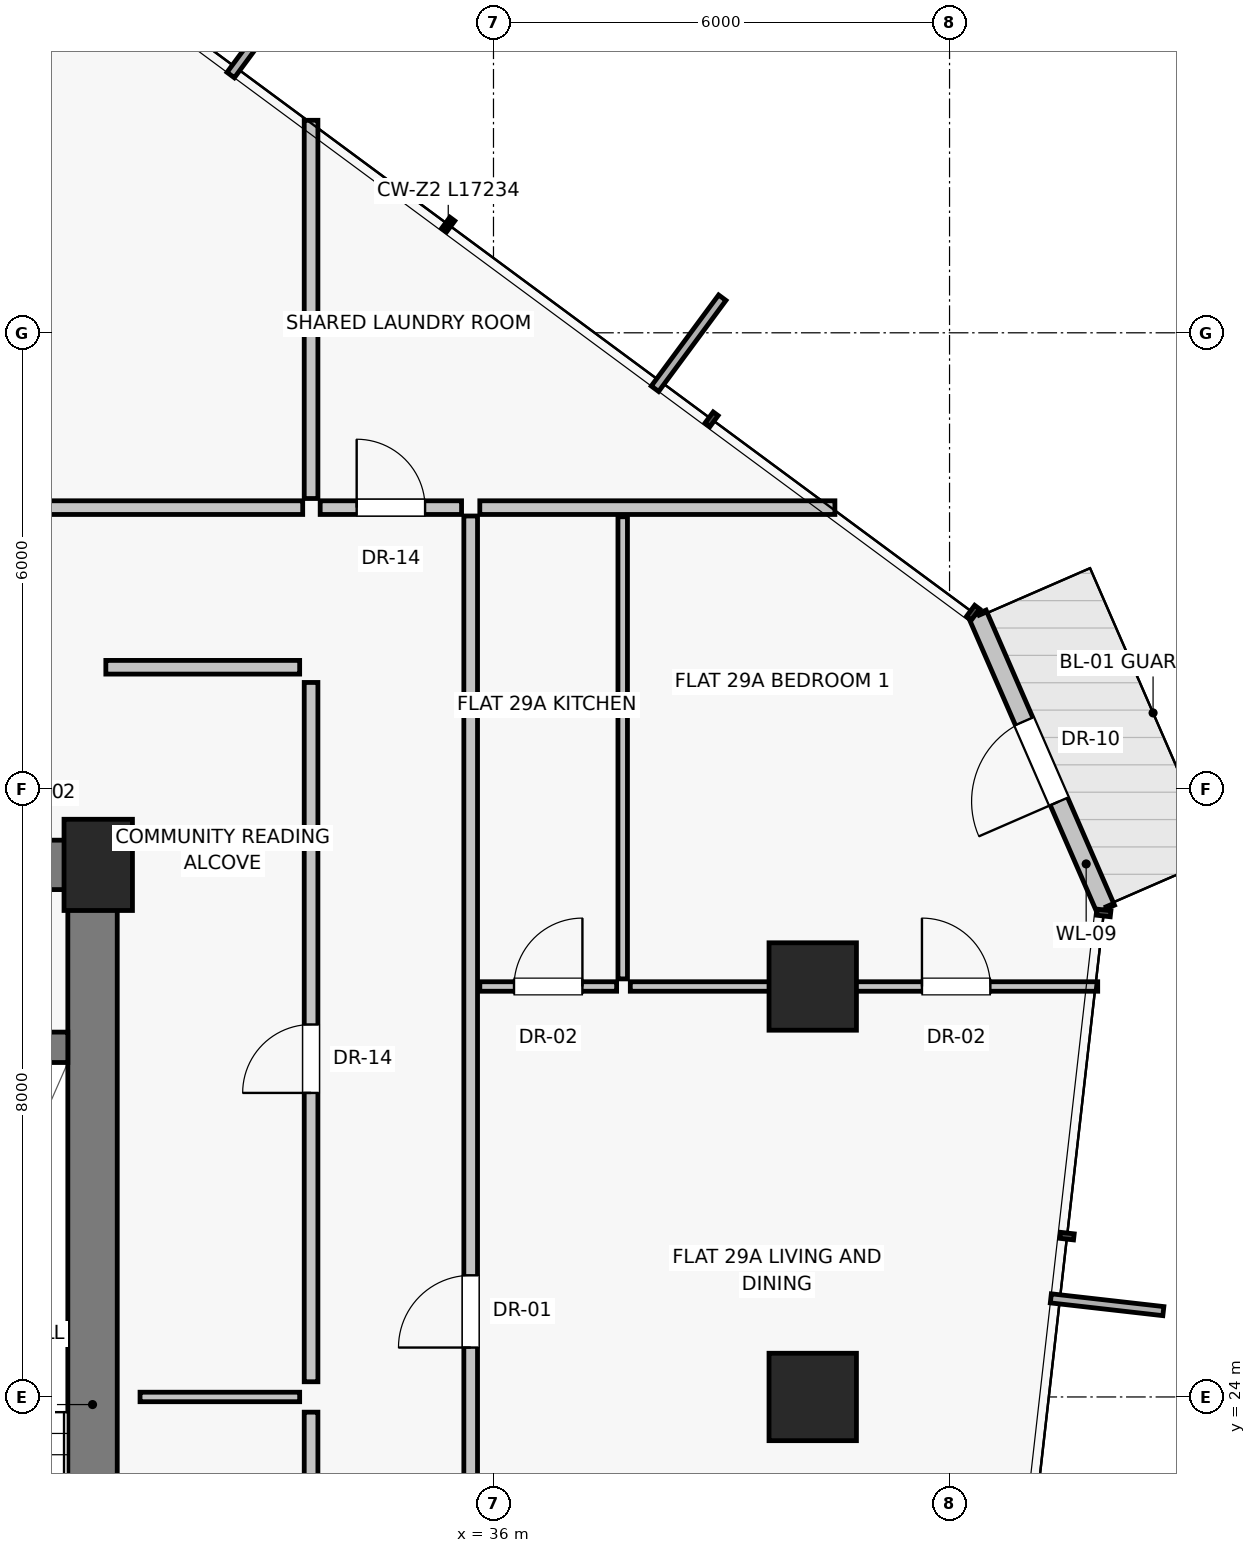
"""IFC4 building model, lengths in metres.
Left out: names, types, materials, properties, quantities, classifications, styles, units other than length and angle.
Written with IfcOpenShell. Run it as: python <this file> out.ifc"""

import sys

from ifc_helpers import new_model, si_unit, direction, frame, frame_2d, origin, origin_2d, place, context, subcontext, project, spatial, rectangle, extrude, source, transform, mapped, element, fill, save


model = new_model("IFC4")
c1 = context("Model", 3, precision=1e-05, world=origin(), true_north=direction((0.0, 1.0)))
c2 = subcontext(c1, "Body", "Model", "MODEL_VIEW")
j1 = project(units=[si_unit("LENGTHUNIT", "METRE"), si_unit("PLANEANGLEUNIT", "RADIAN")], contexts=[c1])
p1 = place(None, origin())
s1 = spatial("IfcSite", under=j1, at=p1, CompositionType="ELEMENT")
p2 = place(p1, origin())
s2 = spatial("IfcBuilding", under=s1, at=p2, CompositionType="ELEMENT")
p3 = place(p2, frame((0.0, 0.0, 105.7)))
s3 = spatial("IfcBuildingStorey", under=s2, at=p3, CompositionType="ELEMENT", Elevation=105.7)
p4 = place(p3, frame((30.8, 31.0, 0.0), z_axis=(0.0, 0.0, 1.0), x_axis=(1.0, 0.0, 0.0)))
e1 = element("IfcColumn", 1, at=p4, inside=s3, PredefinedType="PILASTER", context=c2, shape_type="SweptSolid", body=[
    extrude(rectangle(XDim=0.9, YDim=1.2, at=origin_2d()), origin(), (0.0, 0.0, 1.0), 3.25),
])
for number, where, z_axis, x_axis in (
    (2, (40.2, 24.0, 0.0), (0.0, 0.0, 1.0), (1.0, 0.0, 0.0)),
    (3, (40.2, 29.4, 0.0), (0.0, 0.0, 1.0), (1.0, 0.0, 0.0)),
):
    element("IfcColumn", number, at=place(p3, frame(where, z_axis=z_axis, x_axis=x_axis)), inside=s3, PredefinedType="COLUMN", context=c2, shape_type="SweptSolid", body=[
        extrude(rectangle(XDim=1.15, YDim=1.15, at=origin_2d()), origin(), (0.0, 0.0, 1.0), 3.25),
    ])
p5 = place(p3, frame((44.055, 30.42, 0.0), z_axis=(0.0, 0.0, 1.0), x_axis=(-0.399084577484, 0.916914118124, 0.0)))
e4 = element("IfcWall", 4, at=p5, inside=s3, PredefinedType="SOLIDWALL", context=c2, shape_type="SweptSolid", body=[
    extrude(rectangle(XDim=4.233, YDim=0.25, at=frame_2d((2.117, 0.0))), origin(), (0.0, 0.0, 1.0), 2.97),
])
p6 = place(p5, frame((1.542, 0.0, 0.0)))
e5 = element("IfcOpeningElement", 5, at=p6, cuts=e4, PredefinedType="OPENING", context=c2, shape_type="SweptSolid", body=[
    extrude(rectangle(XDim=1.15, YDim=2.25, at=frame_2d((0.575, 1.125))), frame((0.0, 0.135, 0.0), z_axis=(0.0, -1.0, 0.0), x_axis=(1.0, 0.0, 0.0)), (0.0, 0.0, 1.0), 0.27),
])
p7 = place(p3, frame((30.725, 16.8, 0.0), z_axis=(0.0, 0.0, 1.0), x_axis=(0.0, 1.0, 0.0)))
e6 = element("IfcWall", 6, at=p7, inside=s3, PredefinedType="SHEAR", context=c2, shape_type="SweptSolid", body=[
    extrude(rectangle(XDim=14.2, YDim=0.65, at=frame_2d((7.1, 0.0))), origin(), (0.0, 0.0, 1.0), 2.97),
])
p8 = place(p3, frame((27.0, 31.0, 0.0), z_axis=(0.0, 0.0, 1.0), x_axis=(1.0, 0.0, 0.0)))
e7 = element("IfcWall", 7, at=p8, inside=s3, PredefinedType="SHEAR", context=c2, shape_type="SweptSolid", body=[
    extrude(rectangle(XDim=3.8, YDim=0.65, at=frame_2d((1.9, 0.0))), origin(), (0.0, 0.0, 1.0), 2.97),
])
p9 = place(p8, frame((1.15, 0.0, 0.0)))
e8 = element("IfcOpeningElement", 8, at=p9, cuts=e7, PredefinedType="OPENING", context=c2, shape_type="SweptSolid", body=[
    extrude(rectangle(XDim=1.0, YDim=2.01, at=frame_2d((0.5, 1.005))), frame((0.0, 0.335, 0.0), z_axis=(0.0, -1.0, 0.0), x_axis=(1.0, 0.0, 0.0)), (0.0, 0.0, 1.0), 0.67),
])
p10 = place(p3, frame((27.0, 28.6, 0.0), z_axis=(0.0, 0.0, 1.0), x_axis=(1.0, 0.0, 0.0)))
e9 = element("IfcWall", 9, at=p10, inside=s3, PredefinedType="SHEAR", context=c2, shape_type="SweptSolid", body=[
    extrude(rectangle(XDim=3.4, YDim=0.4, at=frame_2d((1.7, 0.0))), origin(), (0.0, 0.0, 1.0), 2.97),
])
p11 = place(p3, frame((33.6, 14.4, 0.0), z_axis=(0.0, 0.0, 1.0), x_axis=(0.0, 1.0, 0.0)))
e10 = element("IfcWall", 10, at=p11, inside=s3, PredefinedType="PARTITIONING", context=c2, shape_type="SweptSolid", body=[
    extrude(rectangle(XDim=9.4, YDim=0.18, at=frame_2d((4.7, 0.0))), origin(), (0.0, 0.0, 1.0), 2.97),
])
p12 = place(p11, frame((3.8, 0.0, 0.0)))
e11 = element("IfcOpeningElement", 11, at=p12, cuts=e10, PredefinedType="OPENING", context=c2, shape_type="SweptSolid", body=[
    extrude(rectangle(XDim=0.9, YDim=2.01, at=frame_2d((0.45, 1.005))), frame((0.0, 0.1, 0.0), z_axis=(0.0, -1.0, 0.0), x_axis=(1.0, 0.0, 0.0)), (0.0, 0.0, 1.0), 0.2),
])
p13 = place(p3, frame((33.6, 24.2, 0.0), z_axis=(0.0, 0.0, 1.0), x_axis=(0.0, 1.0, 0.0)))
e12 = element("IfcWall", 12, at=p13, inside=s3, PredefinedType="PARTITIONING", context=c2, shape_type="SweptSolid", body=[
    extrude(rectangle(XDim=9.2, YDim=0.18, at=frame_2d((4.6, 0.0))), origin(), (0.0, 0.0, 1.0), 2.97),
])
p14 = place(p13, frame((3.8, 0.0, 0.0)))
e13 = element("IfcOpeningElement", 13, at=p14, cuts=e12, PredefinedType="OPENING", context=c2, shape_type="SweptSolid", body=[
    extrude(rectangle(XDim=0.9, YDim=2.01, at=frame_2d((0.45, 1.005))), frame((0.0, 0.1, 0.0), z_axis=(0.0, -1.0, 0.0), x_axis=(1.0, 0.0, 0.0)), (0.0, 0.0, 1.0), 0.2),
])
p15 = place(p3, frame((31.35, 24.0, 0.0), z_axis=(0.0, 0.0, 1.0), x_axis=(1.0, 0.0, 0.0)))
e14 = element("IfcWall", 14, at=p15, inside=s3, PredefinedType="PARTITIONING", context=c2, shape_type="SweptSolid", body=[
    extrude(rectangle(XDim=2.1, YDim=0.125, at=frame_2d((1.05, 0.0))), origin(), (0.0, 0.0, 1.0), 2.97),
])
p16 = place(p3, frame((30.9, 33.6, 0.0), z_axis=(0.0, 0.0, 1.0), x_axis=(1.0, 0.0, 0.0)))
e15 = element("IfcWall", 15, at=p16, inside=s3, PredefinedType="PARTITIONING", context=c2, shape_type="SweptSolid", body=[
    extrude(rectangle(XDim=2.55, YDim=0.18, at=frame_2d((1.275, 0.0))), origin(), (0.0, 0.0, 1.0), 2.97),
])
p17 = place(p3, frame((33.6, 35.82, 0.0), z_axis=(0.0, 0.0, 1.0), x_axis=(0.0, 1.0, 0.0)))
e16 = element("IfcWall", 16, at=p17, inside=s3, PredefinedType="PARTITIONING", context=c2, shape_type="SweptSolid", body=[
    extrude(rectangle(XDim=4.976, YDim=0.18, at=frame_2d((2.488, 0.0))), origin(), (0.0, 0.0, 1.0), 2.97),
])
p18 = place(p3, frame((24.11, 35.7, 0.0), z_axis=(0.0, 0.0, 1.0), x_axis=(1.0, 0.0, 0.0)))
e17 = element("IfcWall", 17, at=p18, inside=s3, PredefinedType="PARTITIONING", context=c2, shape_type="SweptSolid", body=[
    extrude(rectangle(XDim=9.38, YDim=0.18, at=frame_2d((4.69, 0.0))), origin(), (0.0, 0.0, 1.0), 2.55),
])
p19 = place(p18, frame((4.19, 0.0, 0.0)))
e18 = element("IfcOpeningElement", 18, at=p19, cuts=e17, PredefinedType="OPENING", context=c2, shape_type="SweptSolid", body=[
    extrude(rectangle(XDim=1.0, YDim=2.01, at=frame_2d((0.5, 1.005))), frame((0.0, 0.1, 0.0), z_axis=(0.0, -1.0, 0.0), x_axis=(1.0, 0.0, 0.0)), (0.0, 0.0, 1.0), 0.2),
])
p20 = place(p3, frame((35.82, 35.7, 0.0), z_axis=(0.0, 0.0, 1.0), x_axis=(1.0, 0.0, 0.0)))
e19 = element("IfcWall", 19, at=p20, inside=s3, PredefinedType="PARTITIONING", context=c2, shape_type="SweptSolid", body=[
    extrude(rectangle(XDim=4.672, YDim=0.18, at=frame_2d((2.336, 0.0))), origin(), (0.0, 0.0, 1.0), 2.97),
])
p21 = place(p3, frame((35.7, 18.71, 0.0), z_axis=(0.0, 0.0, 1.0), x_axis=(0.0, 1.0, 0.0)))
e20 = element("IfcWall", 20, at=p21, inside=s3, PredefinedType="PARTITIONING", context=c2, shape_type="SweptSolid", body=[
    extrude(rectangle(XDim=16.88, YDim=0.18, at=frame_2d((8.44, 0.0))), origin(), (0.0, 0.0, 1.0), 2.55),
])
p22 = place(p21, frame((5.94, 0.0, 0.0)))
e21 = element("IfcOpeningElement", 21, at=p22, cuts=e20, PredefinedType="OPENING", context=c2, shape_type="SweptSolid", body=[
    extrude(rectangle(XDim=0.95, YDim=2.02, at=frame_2d((0.475, 1.01))), frame((0.0, 0.1, 0.0), z_axis=(0.0, -1.0, 0.0), x_axis=(1.0, 0.0, 0.0)), (0.0, 0.0, 1.0), 0.2),
])
p23 = place(p3, frame((35.82, 29.4, 0.0), z_axis=(0.0, 0.0, 1.0), x_axis=(1.0, 0.0, 0.0)))
e22 = element("IfcWall", 22, at=p23, inside=s3, PredefinedType="PARTITIONING", context=c2, shape_type="SweptSolid", body=[
    extrude(rectangle(XDim=1.8, YDim=0.125, at=frame_2d((0.9, 0.0))), origin(), (0.0, 0.0, 1.0), 2.348),
])
p24 = place(p23, frame((0.45, 0.0, 0.0)))
e23 = element("IfcOpeningElement", 23, at=p24, cuts=e22, PredefinedType="OPENING", context=c2, shape_type="SweptSolid", body=[
    extrude(rectangle(XDim=0.9, YDim=2.01, at=frame_2d((0.45, 1.005))), frame((0.0, 0.073, 0.0), z_axis=(0.0, -1.0, 0.0), x_axis=(1.0, 0.0, 0.0)), (0.0, 0.0, 1.0), 0.145),
])
p25 = place(p3, frame((37.7, 29.5, 0.0), z_axis=(0.0, 0.0, 1.0), x_axis=(0.0, 1.0, 0.0)))
e24 = element("IfcWall", 24, at=p25, inside=s3, PredefinedType="PARTITIONING", context=c2, shape_type="SweptSolid", body=[
    extrude(rectangle(XDim=6.08, YDim=0.125, at=frame_2d((3.04, 0.0))), origin(), (0.0, 0.0, 1.0), 2.97),
])
p26 = place(p3, frame((37.8, 29.4, 0.0), z_axis=(0.0, 0.0, 1.0), x_axis=(1.0, 0.0, 0.0)))
e25 = element("IfcWall", 25, at=p26, inside=s3, PredefinedType="PARTITIONING", context=c2, shape_type="SweptSolid", body=[
    extrude(rectangle(XDim=6.149, YDim=0.125, at=frame_2d((3.075, 0.0))), origin(), (0.0, 0.0, 1.0), 2.348),
])
p27 = place(p26, frame((3.837, 0.0, 0.0)))
e26 = element("IfcOpeningElement", 26, at=p27, cuts=e25, PredefinedType="OPENING", context=c2, shape_type="SweptSolid", body=[
    extrude(rectangle(XDim=0.9, YDim=2.01, at=frame_2d((0.45, 1.005))), frame((0.0, 0.073, 0.0), z_axis=(0.0, -1.0, 0.0), x_axis=(1.0, 0.0, 0.0)), (0.0, 0.0, 1.0), 0.145),
])
p28 = place(p3, frame((33.72, 35.7, 0.0), z_axis=(0.0, 0.0, 1.0), x_axis=(1.0, 0.0, 0.0)))
e27 = element("IfcWall", 27, at=p28, inside=s3, PredefinedType="PARTITIONING", context=c2, shape_type="SweptSolid", body=[
    extrude(rectangle(XDim=1.86, YDim=0.18, at=frame_2d((0.93, 0.0))), origin(), (0.0, 0.0, 1.0), 2.97),
])
p29 = place(p28, frame((0.48, 0.0, 0.0)))
e28 = element("IfcOpeningElement", 28, at=p29, cuts=e27, PredefinedType="OPENING", context=c2, shape_type="SweptSolid", body=[
    extrude(rectangle(XDim=0.9, YDim=2.01, at=frame_2d((0.45, 1.005))), frame((0.0, 0.1, 0.0), z_axis=(0.0, -1.0, 0.0), x_axis=(1.0, 0.0, 0.0)), (0.0, 0.0, 1.0), 0.2),
])
m1 = source(origin(), c2, "Body", "SweptSolid", [
    extrude(rectangle(XDim=1.15, YDim=2.25, at=frame_2d((0.575, 1.125))), frame((0.0, 0.025, 0.0), z_axis=(0.0, -1.0, 0.0), x_axis=(1.0, 0.0, 0.0)), (0.0, 0.0, 1.0), 0.05),
])
p30 = place(p6, frame((1.15, 0.0, 0.0), z_axis=(0.0, 0.0, 1.0), x_axis=(-1.0, 0.0, 0.0)))
e29 = element("IfcDoor", 29, at=p30, inside=s3, OperationType="SINGLE_SWING_LEFT", PredefinedType="DOOR", context=c2, shape_type="MappedRepresentation", body=[
    mapped(m1, transform((0.0, 0.0, 0.0), scale=1.0)),
])
fill(e5, e29)
m2 = source(origin(), c2, "Body", "SweptSolid", [
    extrude(rectangle(XDim=0.9, YDim=2.01, at=frame_2d((0.45, 1.005))), frame((0.0, 0.025, 0.0), z_axis=(0.0, -1.0, 0.0), x_axis=(1.0, 0.0, 0.0)), (0.0, 0.0, 1.0), 0.05),
])
p31 = place(p14, origin())
e30 = element("IfcDoor", 30, at=p31, inside=s3, OperationType="SINGLE_SWING_LEFT", PredefinedType="DOOR", context=c2, shape_type="MappedRepresentation", body=[
    mapped(m2, transform((0.0, 0.0, 0.0), scale=1.0)),
])
fill(e13, e30)
m3 = source(origin(), c2, "Body", "SweptSolid", [
    extrude(rectangle(XDim=0.95, YDim=2.02, at=frame_2d((0.475, 1.01))), frame((0.0, 0.025, 0.0), z_axis=(0.0, -1.0, 0.0), x_axis=(1.0, 0.0, 0.0)), (0.0, 0.0, 1.0), 0.05),
])
p32 = place(p22, origin())
e31 = element("IfcDoor", 31, at=p32, inside=s3, OperationType="SINGLE_SWING_LEFT", PredefinedType="DOOR", context=c2, shape_type="MappedRepresentation", body=[
    mapped(m3, transform((0.0, 0.0, 0.0), scale=1.0)),
])
fill(e21, e31)
p33 = place(p24, origin())
e32 = element("IfcDoor", 32, at=p33, inside=s3, OperationType="SINGLE_SWING_RIGHT", PredefinedType="DOOR", context=c2, shape_type="MappedRepresentation", body=[
    mapped(m2, transform((0.0, 0.0, 0.0), scale=1.0)),
])
fill(e23, e32)
p34 = place(p27, origin())
e33 = element("IfcDoor", 33, at=p34, inside=s3, OperationType="SINGLE_SWING_LEFT", PredefinedType="DOOR", context=c2, shape_type="MappedRepresentation", body=[
    mapped(m2, transform((0.0, 0.0, 0.0), scale=1.0)),
])
fill(e26, e33)
p35 = place(p29, origin())
e34 = element("IfcDoor", 34, at=p35, inside=s3, OperationType="SINGLE_SWING_LEFT", PredefinedType="DOOR", context=c2, shape_type="MappedRepresentation", body=[
    mapped(m2, transform((0.0, 0.0, 0.0), scale=1.0)),
])
fill(e28, e34)
save(model, sys.argv[1])
